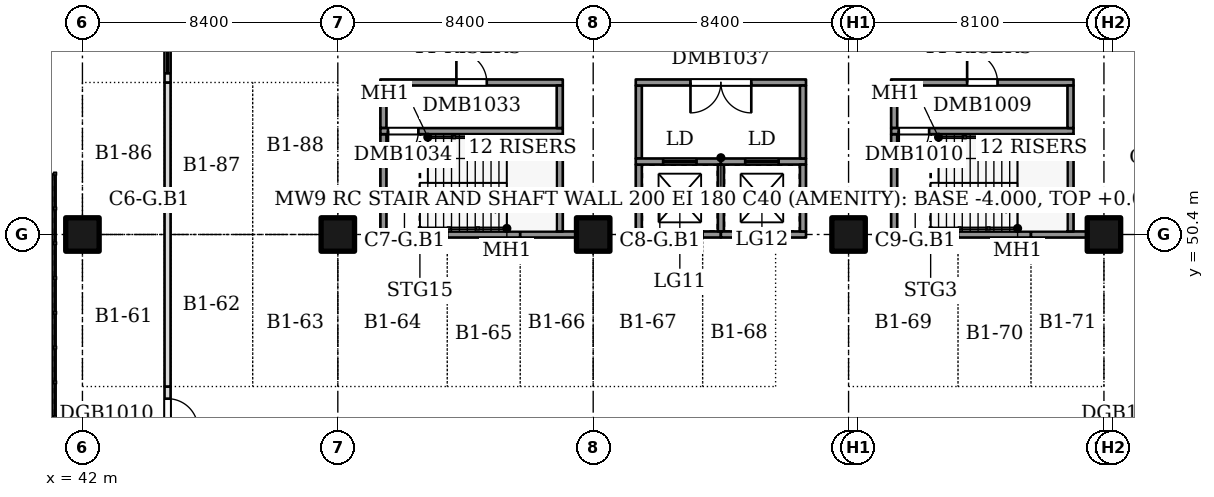
"""IFC4 building model, lengths in metres.
Left out: names, types, materials, properties, quantities, classifications, styles, units other than length and angle.
Written with IfcOpenShell. Run it as: python <this file> out.ifc"""

import sys

from ifc_helpers import new_model, si_unit, direction, frame, frame_2d, origin, origin_2d, place, context, subcontext, project, spatial, rectangle, extrude, element, fill, save


model = new_model("IFC4")
c1 = context("Model", 3, precision=1e-05, world=origin(), true_north=direction((0.0, 1.0)))
c2 = subcontext(c1, "Body", "Model", "MODEL_VIEW")
j1 = project(units=[si_unit("LENGTHUNIT", "METRE"), si_unit("PLANEANGLEUNIT", "RADIAN")], contexts=[c1])
p1 = place(None, origin())
s1 = spatial("IfcSite", under=j1, at=p1, CompositionType="ELEMENT")
p2 = place(p1, origin())
s2 = spatial("IfcBuilding", under=s1, at=p2, CompositionType="ELEMENT")
p3 = place(p2, frame((0.0, 0.0, -4.0)))
s3 = spatial("IfcBuildingStorey", under=s2, at=p3, CompositionType="ELEMENT", Elevation=-4.0)
for number, where, z_axis, x_axis in (
    (1, (42.0, 50.4, 0.0), (0.0, 0.0, 1.0), (1.0, 0.0, 0.0)),
    (2, (50.4, 50.4, 0.0), (0.0, 0.0, 1.0), (1.0, 0.0, 0.0)),
    (3, (58.8, 50.4, 0.0), (0.0, 0.0, 1.0), (1.0, 0.0, 0.0)),
    (4, (67.2, 50.4, 0.0), (0.0, 0.0, 1.0), (1.0, 0.0, 0.0)),
    (5, (75.6, 50.4, 0.0), (0.0, 0.0, 1.0), (1.0, 0.0, 0.0)),
):
    element("IfcColumn", number, at=place(p3, frame(where, z_axis=z_axis, x_axis=x_axis)), inside=s3, PredefinedType="COLUMN", context=c2, shape_type="SweptSolid", body=[
        extrude(rectangle(XDim=1.1, YDim=1.1, at=origin_2d()), origin(), (0.0, 0.0, 1.0), 3.6),
    ])
p4 = place(p3, frame((51.9, 50.5, 0.0), z_axis=(0.0, 0.0, 1.0), x_axis=(0.0, 1.0, 0.0)))
e6 = element("IfcWall", 6, at=p4, inside=s3, PredefinedType="SOLIDWALL", context=c2, shape_type="SweptSolid", body=[
    extrude(rectangle(XDim=3.2, YDim=0.2, at=frame_2d((1.6, 0.0))), origin(), (0.0, 0.0, 1.0), 4.0),
])
p5 = place(p3, frame((51.8, 50.4, 0.0), z_axis=(0.0, 0.0, 1.0), x_axis=(1.0, 0.0, 0.0)))
e7 = element("IfcWall", 7, at=p5, inside=s3, PredefinedType="SOLIDWALL", context=c2, shape_type="SweptSolid", body=[
    extrude(rectangle(XDim=2.2, YDim=0.2, at=frame_2d((1.1, 0.0))), origin(), (0.0, 0.0, 1.0), 4.0),
])
p6 = place(p3, frame((51.9, 53.9, 0.0), z_axis=(0.0, 0.0, 1.0), x_axis=(0.0, 1.0, 0.0)))
e8 = element("IfcWall", 8, at=p6, inside=s3, PredefinedType="SOLIDWALL", context=c2, shape_type="SweptSolid", body=[
    extrude(rectangle(XDim=1.4, YDim=0.2, at=frame_2d((0.7, 0.0))), origin(), (0.0, 0.0, 1.0), 4.0),
])
p7 = place(p3, frame((51.8, 53.8, 0.0), z_axis=(0.0, 0.0, 1.0), x_axis=(1.0, 0.0, 0.0)))
e9 = element("IfcWall", 9, at=p7, inside=s3, PredefinedType="SOLIDWALL", context=c2, shape_type="SweptSolid", body=[
    extrude(rectangle(XDim=6.0, YDim=0.2, at=frame_2d((3.0, 0.0))), origin(), (0.0, 0.0, 1.0), 4.0),
])
p8 = place(p7, frame((0.25, 0.0, 0.0)))
e10 = element("IfcOpeningElement", 10, at=p8, cuts=e9, PredefinedType="OPENING", context=c2, shape_type="SweptSolid", body=[
    extrude(rectangle(XDim=1.0, YDim=2.1, at=frame_2d((0.5, 1.05))), frame((0.0, 0.11, 0.0), z_axis=(0.0, -1.0, 0.0), x_axis=(1.0, 0.0, 0.0)), (0.0, 0.0, 1.0), 0.22),
])
p9 = place(p3, frame((51.8, 55.4, 0.0), z_axis=(0.0, 0.0, 1.0), x_axis=(1.0, 0.0, 0.0)))
e11 = element("IfcWall", 11, at=p9, inside=s3, PredefinedType="SOLIDWALL", context=c2, shape_type="SweptSolid", body=[
    extrude(rectangle(XDim=6.0, YDim=0.2, at=frame_2d((3.0, 0.0))), origin(), (0.0, 0.0, 1.0), 4.0),
])
p10 = place(p9, frame((2.5, 0.0, 0.0)))
e12 = element("IfcOpeningElement", 12, at=p10, cuts=e11, PredefinedType="OPENING", context=c2, shape_type="SweptSolid", body=[
    extrude(rectangle(XDim=1.0, YDim=2.1, at=frame_2d((0.5, 1.05))), frame((0.0, 0.11, 0.0), z_axis=(0.0, -1.0, 0.0), x_axis=(1.0, 0.0, 0.0)), (0.0, 0.0, 1.0), 0.22),
])
p11 = place(p3, frame((54.0, 50.4, 0.0), z_axis=(0.0, 0.0, 1.0), x_axis=(1.0, 0.0, 0.0)))
e13 = element("IfcWall", 13, at=p11, inside=s3, PredefinedType="SOLIDWALL", context=c2, shape_type="SweptSolid", body=[
    extrude(rectangle(XDim=2.4, YDim=0.2, at=frame_2d((1.2, 0.0))), origin(), (0.0, 0.0, 1.0), 4.0),
])
p12 = place(p3, frame((56.4, 50.4, 0.0), z_axis=(0.0, 0.0, 1.0), x_axis=(1.0, 0.0, 0.0)))
e14 = element("IfcWall", 14, at=p12, inside=s3, PredefinedType="SOLIDWALL", context=c2, shape_type="SweptSolid", body=[
    extrude(rectangle(XDim=1.85, YDim=0.2, at=frame_2d((0.925, 0.0))), origin(), (0.0, 0.0, 1.0), 4.0),
])
p13 = place(p3, frame((57.7, 50.5, 0.0), z_axis=(0.0, 0.0, 1.0), x_axis=(0.0, 1.0, 0.0)))
e15 = element("IfcWall", 15, at=p13, inside=s3, PredefinedType="SOLIDWALL", context=c2, shape_type="SweptSolid", body=[
    extrude(rectangle(XDim=3.2, YDim=0.2, at=frame_2d((1.6, 0.0))), origin(), (0.0, 0.0, 1.0), 4.0),
])
p14 = place(p3, frame((57.7, 53.9, 0.0), z_axis=(0.0, 0.0, 1.0), x_axis=(0.0, 1.0, 0.0)))
e16 = element("IfcWall", 16, at=p14, inside=s3, PredefinedType="SOLIDWALL", context=c2, shape_type="SweptSolid", body=[
    extrude(rectangle(XDim=1.4, YDim=0.2, at=frame_2d((0.7, 0.0))), origin(), (0.0, 0.0, 1.0), 4.0),
])
for number, where, z_axis, x_axis in (
    (17, (60.3, 50.5, 0.0), (0.0, 0.0, 1.0), (0.0, 1.0, 0.0)),
    (18, (60.2, 50.4, 0.0), (0.0, 0.0, 1.0), (1.0, 0.0, 0.0)),
):
    element("IfcWall", number, at=place(p3, frame(where, z_axis=z_axis, x_axis=x_axis)), inside=s3, PredefinedType="SOLIDWALL", context=c2, shape_type="SweptSolid", body=[
        extrude(rectangle(XDim=2.2, YDim=0.2, at=frame_2d((1.1, 0.0))), origin(), (0.0, 0.0, 1.0), 4.0),
    ])
p15 = place(p3, frame((60.3, 52.9, 0.0), z_axis=(0.0, 0.0, 1.0), x_axis=(0.0, 1.0, 0.0)))
e19 = element("IfcWall", 19, at=p15, inside=s3, PredefinedType="SOLIDWALL", context=c2, shape_type="SweptSolid", body=[
    extrude(rectangle(XDim=2.4, YDim=0.2, at=frame_2d((1.2, 0.0))), origin(), (0.0, 0.0, 1.0), 4.0),
])
p16 = place(p3, frame((60.2, 52.8, 0.0), z_axis=(0.0, 0.0, 1.0), x_axis=(1.0, 0.0, 0.0)))
e20 = element("IfcWall", 20, at=p16, inside=s3, PredefinedType="SOLIDWALL", context=c2, shape_type="SweptSolid", body=[
    extrude(rectangle(XDim=2.8, YDim=0.2, at=frame_2d((1.4, 0.0))), origin(), (0.0, 0.0, 1.0), 4.0),
])
p17 = place(p16, frame((0.9, 0.0, 0.0)))
e21 = element("IfcOpeningElement", 21, at=p17, cuts=e20, PredefinedType="OPENING", context=c2, shape_type="SweptSolid", body=[
    extrude(rectangle(XDim=1.1, YDim=2.1, at=frame_2d((0.55, 1.05))), frame((0.0, 0.11, 0.0), z_axis=(0.0, -1.0, 0.0), x_axis=(1.0, 0.0, 0.0)), (0.0, 0.0, 1.0), 0.22),
])
p18 = place(p3, frame((60.2, 55.4, 0.0), z_axis=(0.0, 0.0, 1.0), x_axis=(1.0, 0.0, 0.0)))
e22 = element("IfcWall", 22, at=p18, inside=s3, PredefinedType="SOLIDWALL", context=c2, shape_type="SweptSolid", body=[
    extrude(rectangle(XDim=5.6, YDim=0.2, at=frame_2d((2.8, 0.0))), origin(), (0.0, 0.0, 1.0), 4.0),
])
p19 = place(p18, frame((1.8, 0.0, 0.0)))
e23 = element("IfcOpeningElement", 23, at=p19, cuts=e22, PredefinedType="OPENING", context=c2, shape_type="SweptSolid", body=[
    extrude(rectangle(XDim=2.0, YDim=2.1, at=frame_2d((1.0, 1.05))), frame((0.0, 0.11, 0.0), z_axis=(0.0, -1.0, 0.0), x_axis=(1.0, 0.0, 0.0)), (0.0, 0.0, 1.0), 0.22),
])
p20 = place(p3, frame((62.4, 50.4, 0.0), z_axis=(0.0, 0.0, 1.0), x_axis=(1.0, 0.0, 0.0)))
e24 = element("IfcWall", 24, at=p20, inside=s3, PredefinedType="SOLIDWALL", context=c2, shape_type="SweptSolid", body=[
    extrude(rectangle(XDim=0.6, YDim=0.2, at=frame_2d((0.3, 0.0))), origin(), (0.0, 0.0, 1.0), 4.0),
])
p21 = place(p3, frame((63.0, 50.5, 0.0), z_axis=(0.0, 0.0, 1.0), x_axis=(0.0, 1.0, 0.0)))
e25 = element("IfcWall", 25, at=p21, inside=s3, PredefinedType="SOLIDWALL", context=c2, shape_type="SweptSolid", body=[
    extrude(rectangle(XDim=2.2, YDim=0.2, at=frame_2d((1.1, 0.0))), origin(), (0.0, 0.0, 1.0), 4.0),
])
p22 = place(p3, frame((63.0, 50.4, 0.0), z_axis=(0.0, 0.0, 1.0), x_axis=(1.0, 0.0, 0.0)))
e26 = element("IfcWall", 26, at=p22, inside=s3, PredefinedType="SOLIDWALL", context=c2, shape_type="SweptSolid", body=[
    extrude(rectangle(XDim=1.8, YDim=0.2, at=frame_2d((0.9, 0.0))), origin(), (0.0, 0.0, 1.0), 4.0),
])
p23 = place(p3, frame((63.0, 52.8, 0.0), z_axis=(0.0, 0.0, 1.0), x_axis=(1.0, 0.0, 0.0)))
e27 = element("IfcWall", 27, at=p23, inside=s3, PredefinedType="SOLIDWALL", context=c2, shape_type="SweptSolid", body=[
    extrude(rectangle(XDim=2.8, YDim=0.2, at=frame_2d((1.4, 0.0))), origin(), (0.0, 0.0, 1.0), 4.0),
])
p24 = place(p23, frame((0.8, 0.0, 0.0)))
e28 = element("IfcOpeningElement", 28, at=p24, cuts=e27, PredefinedType="OPENING", context=c2, shape_type="SweptSolid", body=[
    extrude(rectangle(XDim=1.1, YDim=2.1, at=frame_2d((0.55, 1.05))), frame((0.0, 0.11, 0.0), z_axis=(0.0, -1.0, 0.0), x_axis=(1.0, 0.0, 0.0)), (0.0, 0.0, 1.0), 0.22),
])
p25 = place(p3, frame((64.8, 50.4, 0.0), z_axis=(0.0, 0.0, 1.0), x_axis=(1.0, 0.0, 0.0)))
e29 = element("IfcWall", 29, at=p25, inside=s3, PredefinedType="SOLIDWALL", context=c2, shape_type="SweptSolid", body=[
    extrude(rectangle(XDim=1.0, YDim=0.2, at=frame_2d((0.5, 0.0))), origin(), (0.0, 0.0, 1.0), 4.0),
])
p26 = place(p3, frame((65.7, 50.5, 0.0), z_axis=(0.0, 0.0, 1.0), x_axis=(0.0, 1.0, 0.0)))
e30 = element("IfcWall", 30, at=p26, inside=s3, PredefinedType="SOLIDWALL", context=c2, shape_type="SweptSolid", body=[
    extrude(rectangle(XDim=2.2, YDim=0.2, at=frame_2d((1.1, 0.0))), origin(), (0.0, 0.0, 1.0), 4.0),
])
p27 = place(p3, frame((65.7, 52.9, 0.0), z_axis=(0.0, 0.0, 1.0), x_axis=(0.0, 1.0, 0.0)))
e31 = element("IfcWall", 31, at=p27, inside=s3, PredefinedType="SOLIDWALL", context=c2, shape_type="SweptSolid", body=[
    extrude(rectangle(XDim=2.4, YDim=0.2, at=frame_2d((1.2, 0.0))), origin(), (0.0, 0.0, 1.0), 4.0),
])
p28 = place(p3, frame((68.7, 50.5, 0.0), z_axis=(0.0, 0.0, 1.0), x_axis=(0.0, 1.0, 0.0)))
e32 = element("IfcWall", 32, at=p28, inside=s3, PredefinedType="SOLIDWALL", context=c2, shape_type="SweptSolid", body=[
    extrude(rectangle(XDim=3.2, YDim=0.2, at=frame_2d((1.6, 0.0))), origin(), (0.0, 0.0, 1.0), 4.0),
])
p29 = place(p3, frame((68.6, 50.4, 0.0), z_axis=(0.0, 0.0, 1.0), x_axis=(1.0, 0.0, 0.0)))
e33 = element("IfcWall", 33, at=p29, inside=s3, PredefinedType="SOLIDWALL", context=c2, shape_type="SweptSolid", body=[
    extrude(rectangle(XDim=2.2, YDim=0.2, at=frame_2d((1.1, 0.0))), origin(), (0.0, 0.0, 1.0), 4.0),
])
p30 = place(p3, frame((68.7, 53.9, 0.0), z_axis=(0.0, 0.0, 1.0), x_axis=(0.0, 1.0, 0.0)))
e34 = element("IfcWall", 34, at=p30, inside=s3, PredefinedType="SOLIDWALL", context=c2, shape_type="SweptSolid", body=[
    extrude(rectangle(XDim=1.4, YDim=0.2, at=frame_2d((0.7, 0.0))), origin(), (0.0, 0.0, 1.0), 4.0),
])
p31 = place(p3, frame((68.6, 53.8, 0.0), z_axis=(0.0, 0.0, 1.0), x_axis=(1.0, 0.0, 0.0)))
e35 = element("IfcWall", 35, at=p31, inside=s3, PredefinedType="SOLIDWALL", context=c2, shape_type="SweptSolid", body=[
    extrude(rectangle(XDim=6.0, YDim=0.2, at=frame_2d((3.0, 0.0))), origin(), (0.0, 0.0, 1.0), 4.0),
])
p32 = place(p31, frame((0.25, 0.0, 0.0)))
e36 = element("IfcOpeningElement", 36, at=p32, cuts=e35, PredefinedType="OPENING", context=c2, shape_type="SweptSolid", body=[
    extrude(rectangle(XDim=1.0, YDim=2.1, at=frame_2d((0.5, 1.05))), frame((0.0, 0.11, 0.0), z_axis=(0.0, -1.0, 0.0), x_axis=(1.0, 0.0, 0.0)), (0.0, 0.0, 1.0), 0.22),
])
p33 = place(p3, frame((68.6, 55.4, 0.0), z_axis=(0.0, 0.0, 1.0), x_axis=(1.0, 0.0, 0.0)))
e37 = element("IfcWall", 37, at=p33, inside=s3, PredefinedType="SOLIDWALL", context=c2, shape_type="SweptSolid", body=[
    extrude(rectangle(XDim=6.0, YDim=0.2, at=frame_2d((3.0, 0.0))), origin(), (0.0, 0.0, 1.0), 4.0),
])
p34 = place(p33, frame((2.5, 0.0, 0.0)))
e38 = element("IfcOpeningElement", 38, at=p34, cuts=e37, PredefinedType="OPENING", context=c2, shape_type="SweptSolid", body=[
    extrude(rectangle(XDim=1.0, YDim=2.1, at=frame_2d((0.5, 1.05))), frame((0.0, 0.11, 0.0), z_axis=(0.0, -1.0, 0.0), x_axis=(1.0, 0.0, 0.0)), (0.0, 0.0, 1.0), 0.22),
])
p35 = place(p3, frame((70.8, 50.4, 0.0), z_axis=(0.0, 0.0, 1.0), x_axis=(1.0, 0.0, 0.0)))
e39 = element("IfcWall", 39, at=p35, inside=s3, PredefinedType="SOLIDWALL", context=c2, shape_type="SweptSolid", body=[
    extrude(rectangle(XDim=2.4, YDim=0.2, at=frame_2d((1.2, 0.0))), origin(), (0.0, 0.0, 1.0), 4.0),
])
p36 = place(p3, frame((73.2, 50.4, 0.0), z_axis=(0.0, 0.0, 1.0), x_axis=(1.0, 0.0, 0.0)))
e40 = element("IfcWall", 40, at=p36, inside=s3, PredefinedType="SOLIDWALL", context=c2, shape_type="SweptSolid", body=[
    extrude(rectangle(XDim=1.85, YDim=0.2, at=frame_2d((0.925, 0.0))), origin(), (0.0, 0.0, 1.0), 4.0),
])
p37 = place(p3, frame((74.5, 50.5, 0.0), z_axis=(0.0, 0.0, 1.0), x_axis=(0.0, 1.0, 0.0)))
e41 = element("IfcWall", 41, at=p37, inside=s3, PredefinedType="SOLIDWALL", context=c2, shape_type="SweptSolid", body=[
    extrude(rectangle(XDim=3.2, YDim=0.2, at=frame_2d((1.6, 0.0))), origin(), (0.0, 0.0, 1.0), 4.0),
])
p38 = place(p3, frame((74.5, 53.9, 0.0), z_axis=(0.0, 0.0, 1.0), x_axis=(0.0, 1.0, 0.0)))
e42 = element("IfcWall", 42, at=p38, inside=s3, PredefinedType="SOLIDWALL", context=c2, shape_type="SweptSolid", body=[
    extrude(rectangle(XDim=1.4, YDim=0.2, at=frame_2d((0.7, 0.0))), origin(), (0.0, 0.0, 1.0), 4.0),
])
p39 = place(p3, frame((44.8, 38.6, 0.0), z_axis=(0.0, 0.0, 1.0), x_axis=(0.0, 1.0, 0.0)))
e43 = element("IfcWall", 43, at=p39, inside=s3, PredefinedType="PARTITIONING", context=c2, shape_type="SweptSolid", body=[
    extrude(rectangle(XDim=6.8, YDim=0.2, at=frame_2d((3.4, 0.0))), origin(), (0.0, 0.0, 1.0), 3.6),
])
p40 = place(p39, frame((0.3, 0.0, 0.0)))
e44 = element("IfcOpeningElement", 44, at=p40, cuts=e43, PredefinedType="OPENING", context=c2, shape_type="SweptSolid", body=[
    extrude(rectangle(XDim=4.8, YDim=2.4, at=frame_2d((2.4, 1.2))), frame((0.0, 0.11, 0.0), z_axis=(0.0, -1.0, 0.0), x_axis=(1.0, 0.0, 0.0)), (0.0, 0.0, 1.0), 0.22),
])
p41 = place(p39, frame((5.4, 0.0, 0.0)))
e45 = element("IfcOpeningElement", 45, at=p41, cuts=e43, PredefinedType="OPENING", context=c2, shape_type="SweptSolid", body=[
    extrude(rectangle(XDim=1.0, YDim=2.1, at=frame_2d((0.5, 1.05))), frame((0.0, 0.11, 0.0), z_axis=(0.0, -1.0, 0.0), x_axis=(1.0, 0.0, 0.0)), (0.0, 0.0, 1.0), 0.22),
])
p42 = place(p3, frame((44.8, 45.4, 0.0), z_axis=(0.0, 0.0, 1.0), x_axis=(0.0, 1.0, 0.0)))
e46 = element("IfcWall", 46, at=p42, inside=s3, PredefinedType="PARTITIONING", context=c2, shape_type="SweptSolid", body=[
    extrude(rectangle(XDim=10.0, YDim=0.2, at=frame_2d((5.0, 0.0))), origin(), (0.0, 0.0, 1.0), 3.6),
])
p43 = place(p3, frame((44.8, 55.4, 0.0), z_axis=(0.0, 0.0, 1.0), x_axis=(0.0, 1.0, 0.0)))
e47 = element("IfcWall", 47, at=p43, inside=s3, PredefinedType="PARTITIONING", context=c2, shape_type="SweptSolid", body=[
    extrude(rectangle(XDim=6.8, YDim=0.2, at=frame_2d((3.4, 0.0))), origin(), (0.0, 0.0, 1.0), 3.6),
])
p44 = place(p43, frame((0.3, 0.0, 0.0)))
e48 = element("IfcOpeningElement", 48, at=p44, cuts=e47, PredefinedType="OPENING", context=c2, shape_type="SweptSolid", body=[
    extrude(rectangle(XDim=4.8, YDim=2.4, at=frame_2d((2.4, 1.2))), frame((0.0, 0.11, 0.0), z_axis=(0.0, -1.0, 0.0), x_axis=(1.0, 0.0, 0.0)), (0.0, 0.0, 1.0), 0.22),
])
p45 = place(p43, frame((5.4, 0.0, 0.0)))
e49 = element("IfcOpeningElement", 49, at=p45, cuts=e47, PredefinedType="OPENING", context=c2, shape_type="SweptSolid", body=[
    extrude(rectangle(XDim=1.0, YDim=2.1, at=frame_2d((0.5, 1.05))), frame((0.0, 0.11, 0.0), z_axis=(0.0, -1.0, 0.0), x_axis=(1.0, 0.0, 0.0)), (0.0, 0.0, 1.0), 0.22),
])
p46 = place(p34, origin())
e50 = element("IfcDoor", 50, at=p46, inside=s3, OperationType="SINGLE_SWING_LEFT", PredefinedType="DOOR", context=c2, shape_type="SweptSolid", body=[
    extrude(rectangle(XDim=1.0, YDim=2.1, at=frame_2d((0.5, 1.05))), frame((0.0, 0.025, 0.0), z_axis=(0.0, -1.0, 0.0), x_axis=(1.0, 0.0, 0.0)), (0.0, 0.0, 1.0), 0.05),
])
fill(e38, e50)
p47 = place(p32, frame((1.0, 0.0, 0.0), z_axis=(0.0, 0.0, 1.0), x_axis=(-1.0, 0.0, 0.0)))
e51 = element("IfcDoor", 51, at=p47, inside=s3, OperationType="SINGLE_SWING_RIGHT", PredefinedType="DOOR", context=c2, shape_type="SweptSolid", body=[
    extrude(rectangle(XDim=1.0, YDim=2.1, at=frame_2d((0.5, 1.05))), frame((0.0, 0.025, 0.0), z_axis=(0.0, -1.0, 0.0), x_axis=(1.0, 0.0, 0.0)), (0.0, 0.0, 1.0), 0.05),
])
fill(e36, e51)
p48 = place(p10, origin())
e52 = element("IfcDoor", 52, at=p48, inside=s3, OperationType="SINGLE_SWING_LEFT", PredefinedType="DOOR", context=c2, shape_type="SweptSolid", body=[
    extrude(rectangle(XDim=1.0, YDim=2.1, at=frame_2d((0.5, 1.05))), frame((0.0, 0.025, 0.0), z_axis=(0.0, -1.0, 0.0), x_axis=(1.0, 0.0, 0.0)), (0.0, 0.0, 1.0), 0.05),
])
fill(e12, e52)
p49 = place(p8, frame((1.0, 0.0, 0.0), z_axis=(0.0, 0.0, 1.0), x_axis=(-1.0, 0.0, 0.0)))
e53 = element("IfcDoor", 53, at=p49, inside=s3, OperationType="SINGLE_SWING_RIGHT", PredefinedType="DOOR", context=c2, shape_type="SweptSolid", body=[
    extrude(rectangle(XDim=1.0, YDim=2.1, at=frame_2d((0.5, 1.05))), frame((0.0, 0.025, 0.0), z_axis=(0.0, -1.0, 0.0), x_axis=(1.0, 0.0, 0.0)), (0.0, 0.0, 1.0), 0.05),
])
fill(e10, e53)
p50 = place(p19, frame((2.0, 0.0, 0.0), z_axis=(0.0, 0.0, 1.0), x_axis=(-1.0, 0.0, 0.0)))
e54 = element("IfcDoor", 54, at=p50, inside=s3, OperationType="DOUBLE_DOOR_SINGLE_SWING", PredefinedType="DOOR", context=c2, shape_type="SweptSolid", body=[
    extrude(rectangle(XDim=2.0, YDim=2.1, at=frame_2d((1.0, 1.05))), frame((0.0, 0.025, 0.0), z_axis=(0.0, -1.0, 0.0), x_axis=(1.0, 0.0, 0.0)), (0.0, 0.0, 1.0), 0.05),
])
fill(e23, e54)
p51 = place(p17, origin())
e55 = element("IfcDoor", 55, at=p51, inside=s3, OperationType="SLIDING_TO_LEFT", PredefinedType="DOOR", context=c2, shape_type="SweptSolid", body=[
    extrude(rectangle(XDim=1.1, YDim=2.1, at=frame_2d((0.55, 1.05))), frame((0.0, 0.025, 0.0), z_axis=(0.0, -1.0, 0.0), x_axis=(1.0, 0.0, 0.0)), (0.0, 0.0, 1.0), 0.05),
])
fill(e21, e55)
p52 = place(p24, origin())
e56 = element("IfcDoor", 56, at=p52, inside=s3, OperationType="SLIDING_TO_LEFT", PredefinedType="DOOR", context=c2, shape_type="SweptSolid", body=[
    extrude(rectangle(XDim=1.1, YDim=2.1, at=frame_2d((0.55, 1.05))), frame((0.0, 0.025, 0.0), z_axis=(0.0, -1.0, 0.0), x_axis=(1.0, 0.0, 0.0)), (0.0, 0.0, 1.0), 0.05),
])
fill(e28, e56)
p53 = place(p41, frame((1.0, 0.0, 0.0), z_axis=(0.0, 0.0, 1.0), x_axis=(-1.0, 0.0, 0.0)))
e57 = element("IfcDoor", 57, at=p53, inside=s3, OperationType="SINGLE_SWING_RIGHT", PredefinedType="DOOR", context=c2, shape_type="SweptSolid", body=[
    extrude(rectangle(XDim=1.0, YDim=2.1, at=frame_2d((0.5, 1.05))), frame((0.0, 0.025, 0.0), z_axis=(0.0, -1.0, 0.0), x_axis=(1.0, 0.0, 0.0)), (0.0, 0.0, 1.0), 0.05),
])
fill(e45, e57)
p54 = place(p44, origin())
e58 = element("IfcDoor", 58, at=p54, inside=s3, OperationType="ROLLINGUP", PredefinedType="GATE", context=c2, shape_type="SweptSolid", body=[
    extrude(rectangle(XDim=4.8, YDim=2.4, at=frame_2d((2.4, 1.2))), frame((0.0, 0.025, 0.0), z_axis=(0.0, -1.0, 0.0), x_axis=(1.0, 0.0, 0.0)), (0.0, 0.0, 1.0), 0.05),
])
fill(e48, e58)
save(model, sys.argv[1])
